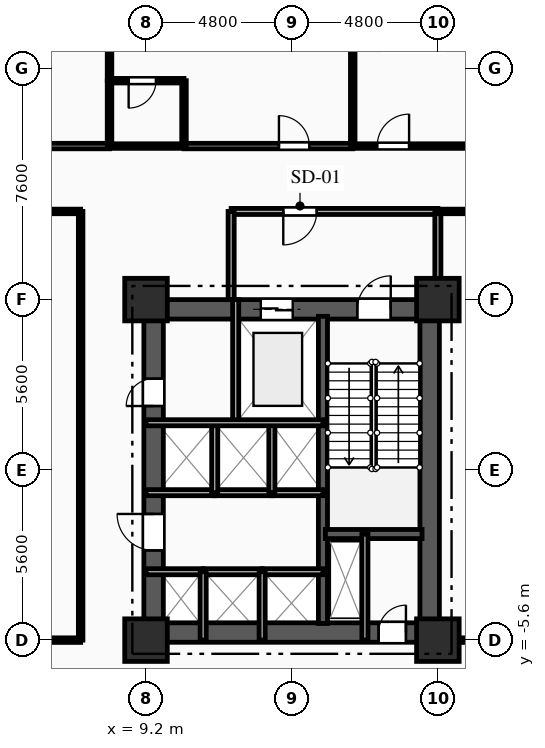
"""IFC4 building model, lengths in metres.
Left out: names, types, materials, properties, quantities, classifications, styles, units other than length and angle.
Written with IfcOpenShell. Run it as: python <this file> out.ifc"""

import sys

from ifc_helpers import new_model, si_unit, direction, frame, frame_2d, origin, origin_2d, place, context, subcontext, project, spatial, rectangle, extrude, element, fill, save


model = new_model("IFC4")
c1 = context("Model", 3, precision=1e-05, world=origin(), true_north=direction((0.0, 1.0)))
c2 = subcontext(c1, "Body", "Model", "MODEL_VIEW")
j1 = project(units=[si_unit("LENGTHUNIT", "METRE"), si_unit("PLANEANGLEUNIT", "RADIAN")], contexts=[c1])
p1 = place(None, origin())
s1 = spatial("IfcSite", under=j1, at=p1, CompositionType="ELEMENT")
p2 = place(p1, origin())
s2 = spatial("IfcBuilding", under=s1, at=p2, CompositionType="ELEMENT")
p3 = place(p2, frame((0.0, 0.0, 18.0)))
s3 = spatial("IfcBuildingStorey", under=s2, at=p3, CompositionType="ELEMENT", Elevation=18.0)
for number, where, z_axis, x_axis in (
    (1, (9.2, -5.6, 0.0), (0.0, 0.0, 1.0), (1.0, 0.0, 0.0)),
    (2, (9.2, 5.6, 0.0), (0.0, 0.0, 1.0), (1.0, 0.0, 0.0)),
    (3, (18.8, -5.6, 0.0), (0.0, 0.0, 1.0), (1.0, 0.0, 0.0)),
    (4, (18.8, 5.6, 0.0), (0.0, 0.0, 1.0), (1.0, 0.0, 0.0)),
):
    element("IfcColumn", number, at=place(p3, frame(where, z_axis=z_axis, x_axis=x_axis)), inside=s3, PredefinedType="COLUMN", context=c2, shape_type="SweptSolid", body=[
        extrude(rectangle(XDim=1.4, YDim=1.4, at=origin_2d()), origin(), (0.0, 0.0, 1.0), 4.5),
    ])
p4 = place(p3, frame((9.2, 5.28, 0.0), z_axis=(0.0, 0.0, 1.0), x_axis=(1.0, 0.0, 0.0)))
e5 = element("IfcWall", 5, at=p4, inside=s3, PredefinedType="SHEAR", context=c2, shape_type="SweptSolid", body=[
    extrude(rectangle(XDim=9.6, YDim=0.64, at=frame_2d((4.8, 0.0))), origin(), (0.0, 0.0, 1.0), 4.17),
])
p5 = place(p4, frame((6.95, 0.0, 0.0)))
e6 = element("IfcOpeningElement", 6, at=p5, cuts=e5, PredefinedType="OPENING", context=c2, shape_type="SweptSolid", body=[
    extrude(rectangle(XDim=1.1, YDim=2.15, at=frame_2d((0.55, 1.075))), frame((0.0, 0.33, 0.0), z_axis=(0.0, -1.0, 0.0), x_axis=(1.0, 0.0, 0.0)), (0.0, 0.0, 1.0), 0.66),
])
p6 = place(p4, frame((3.775, 0.0, 0.0)))
e7 = element("IfcOpeningElement", 7, at=p6, cuts=e5, PredefinedType="OPENING", context=c2, shape_type="SweptSolid", body=[
    extrude(rectangle(XDim=1.05, YDim=2.1, at=frame_2d((0.525, 1.05))), frame((0.0, 0.33, 0.0), z_axis=(0.0, -1.0, 0.0), x_axis=(1.0, 0.0, 0.0)), (0.0, 0.0, 1.0), 0.66),
])
p7 = place(p3, frame((9.2, -5.35, 0.0), z_axis=(0.0, 0.0, 1.0), x_axis=(1.0, 0.0, 0.0)))
e8 = element("IfcWall", 8, at=p7, inside=s3, PredefinedType="SHEAR", context=c2, shape_type="SweptSolid", body=[
    extrude(rectangle(XDim=9.6, YDim=0.64, at=frame_2d((4.8, 0.0))), origin(), (0.0, 0.0, 1.0), 4.17),
])
p8 = place(p7, frame((7.65, 0.0, 0.0)))
e9 = element("IfcOpeningElement", 9, at=p8, cuts=e8, PredefinedType="OPENING", context=c2, shape_type="SweptSolid", body=[
    extrude(rectangle(XDim=0.9, YDim=2.1, at=frame_2d((0.45, 1.05))), frame((0.0, 0.33, 0.0), z_axis=(0.0, -1.0, 0.0), x_axis=(1.0, 0.0, 0.0)), (0.0, 0.0, 1.0), 0.66),
])
p9 = place(p3, frame((9.45, -5.05, 0.0), z_axis=(0.0, 0.0, 1.0), x_axis=(0.0, 1.0, 0.0)))
e10 = element("IfcWall", 10, at=p9, inside=s3, PredefinedType="SHEAR", context=c2, shape_type="SweptSolid", body=[
    extrude(rectangle(XDim=10.1, YDim=0.64, at=frame_2d((5.05, 0.0))), origin(), (0.0, 0.0, 1.0), 4.17),
])
p10 = place(p9, frame((7.15, 0.0, 0.0)))
e11 = element("IfcOpeningElement", 11, at=p10, cuts=e10, PredefinedType="OPENING", context=c2, shape_type="SweptSolid", body=[
    extrude(rectangle(XDim=0.9, YDim=2.1, at=frame_2d((0.45, 1.05))), frame((0.0, 0.33, 0.0), z_axis=(0.0, -1.0, 0.0), x_axis=(1.0, 0.0, 0.0)), (0.0, 0.0, 1.0), 0.66),
])
p11 = place(p9, frame((2.4, 0.0, 0.0)))
e12 = element("IfcOpeningElement", 12, at=p11, cuts=e10, PredefinedType="OPENING", context=c2, shape_type="SweptSolid", body=[
    extrude(rectangle(XDim=1.2, YDim=2.15, at=frame_2d((0.6, 1.075))), frame((0.0, 0.33, 0.0), z_axis=(0.0, -1.0, 0.0), x_axis=(1.0, 0.0, 0.0)), (0.0, 0.0, 1.0), 0.66),
])
p12 = place(p3, frame((18.53, -5.05, 0.0), z_axis=(0.0, 0.0, 1.0), x_axis=(0.0, 1.0, 0.0)))
e13 = element("IfcWall", 13, at=p12, inside=s3, PredefinedType="SHEAR", context=c2, shape_type="SweptSolid", body=[
    extrude(rectangle(XDim=10.1, YDim=0.64, at=frame_2d((5.05, 0.0))), origin(), (0.0, 0.0, 1.0), 4.17),
])
p13 = place(p3, frame((15.02, -5.05, 0.0), z_axis=(0.0, 0.0, 1.0), x_axis=(0.0, 1.0, 0.0)))
e14 = element("IfcWall", 14, at=p13, inside=s3, PredefinedType="SHEAR", context=c2, shape_type="SweptSolid", body=[
    extrude(rectangle(XDim=10.1, YDim=0.3, at=frame_2d((5.05, 0.0))), origin(), (0.0, 0.0, 1.0), 4.17),
])
p14 = place(p3, frame((15.1, -2.11, 0.0), z_axis=(0.0, 0.0, 1.0), x_axis=(1.0, 0.0, 0.0)))
e15 = element("IfcWall", 15, at=p14, inside=s3, PredefinedType="SHEAR", context=c2, shape_type="SweptSolid", body=[
    extrude(rectangle(XDim=3.18, YDim=0.3, at=frame_2d((1.59, 0.0))), origin(), (0.0, 0.0, 1.0), 4.17),
])
p15 = place(p3, frame((16.4, -2.11, 0.0), z_axis=(0.0, 0.0, 1.0), x_axis=(0.0, -1.0, 0.0)))
e16 = element("IfcWall", 16, at=p15, inside=s3, PredefinedType="PARTITIONING", context=c2, shape_type="SweptSolid", body=[
    extrude(rectangle(XDim=3.49, YDim=0.2, at=frame_2d((1.745, 0.0))), origin(), (0.0, 0.0, 1.0), 4.17),
])
p16 = place(p3, frame((12.15, 5.6, 0.0), z_axis=(0.0, 0.0, 1.0), x_axis=(0.0, -1.0, 0.0)))
e17 = element("IfcWall", 17, at=p16, inside=s3, PredefinedType="PARTITIONING", context=c2, shape_type="SweptSolid", body=[
    extrude(rectangle(XDim=4.05, YDim=0.2, at=frame_2d((2.025, 0.0))), origin(), (0.0, 0.0, 1.0), 4.17),
])
p17 = place(p3, frame((18.8, 8.5, 0.0), z_axis=(0.0, 0.0, 1.0), x_axis=(-1.0, 0.0, 0.0)))
e18 = element("IfcWall", 18, at=p17, inside=s3, PredefinedType="PARTITIONING", context=c2, shape_type="SweptSolid", body=[
    extrude(rectangle(XDim=6.8, YDim=0.2, at=frame_2d((3.4, 0.0))), origin(), (0.0, 0.0, 1.0), 4.17),
])
p18 = place(p17, frame((3.985, 0.0, 0.0)))
e19 = element("IfcOpeningElement", 19, at=p18, cuts=e18, PredefinedType="OPENING", context=c2, shape_type="SweptSolid", body=[
    extrude(rectangle(XDim=1.1, YDim=2.15, at=frame_2d((0.55, 1.075))), frame((0.0, 0.11, 0.0), z_axis=(0.0, -1.0, 0.0), x_axis=(1.0, 0.0, 0.0)), (0.0, 0.0, 1.0), 0.22),
])
p19 = place(p3, frame((12.0, 8.5, 0.0), z_axis=(0.0, 0.0, 1.0), x_axis=(0.0, -1.0, 0.0)))
e20 = element("IfcWall", 20, at=p19, inside=s3, PredefinedType="PARTITIONING", context=c2, shape_type="SweptSolid", body=[
    extrude(rectangle(XDim=2.9, YDim=0.2, at=frame_2d((1.45, 0.0))), origin(), (0.0, 0.0, 1.0), 4.17),
])
p20 = place(p3, frame((18.8, 5.6, 0.0), z_axis=(0.0, 0.0, 1.0), x_axis=(0.0, 1.0, 0.0)))
e21 = element("IfcWall", 21, at=p20, inside=s3, PredefinedType="PARTITIONING", context=c2, shape_type="SweptSolid", body=[
    extrude(rectangle(XDim=2.9, YDim=0.2, at=frame_2d((1.45, 0.0))), origin(), (0.0, 0.0, 1.0), 3.655),
])
p21 = place(p3, frame((9.2, -3.35, 0.0), z_axis=(0.0, 0.0, 1.0), x_axis=(1.0, 0.0, 0.0)))
e22 = element("IfcWall", 22, at=p21, inside=s3, PredefinedType="PARTITIONING", context=c2, shape_type="SweptSolid", body=[
    extrude(rectangle(XDim=1.88, YDim=0.2, at=frame_2d((0.94, 0.0))), origin(), (0.0, 0.0, 1.0), 3.885),
])
p22 = place(p3, frame((11.08, -3.35, 0.0), z_axis=(0.0, 0.0, 1.0), x_axis=(1.0, 0.0, 0.0)))
e23 = element("IfcWall", 23, at=p22, inside=s3, PredefinedType="PARTITIONING", context=c2, shape_type="SweptSolid", body=[
    extrude(rectangle(XDim=1.94, YDim=0.2, at=frame_2d((0.97, 0.0))), origin(), (0.0, 0.0, 1.0), 4.17),
])
p23 = place(p3, frame((13.02, -3.35, 0.0), z_axis=(0.0, 0.0, 1.0), x_axis=(1.0, 0.0, 0.0)))
e24 = element("IfcWall", 24, at=p23, inside=s3, PredefinedType="PARTITIONING", context=c2, shape_type="SweptSolid", body=[
    extrude(rectangle(XDim=2.0, YDim=0.2, at=frame_2d((1.0, 0.0))), origin(), (0.0, 0.0, 1.0), 4.17),
])
p24 = place(p3, frame((11.46, -0.75, 0.0), z_axis=(0.0, 0.0, 1.0), x_axis=(-1.0, 0.0, 0.0)))
e25 = element("IfcWall", 25, at=p24, inside=s3, PredefinedType="PARTITIONING", context=c2, shape_type="SweptSolid", body=[
    extrude(rectangle(XDim=2.26, YDim=0.2, at=frame_2d((1.13, 0.0))), origin(), (0.0, 0.0, 1.0), 4.17),
])
p25 = place(p3, frame((13.34, -0.75, 0.0), z_axis=(0.0, 0.0, 1.0), x_axis=(-1.0, 0.0, 0.0)))
e26 = element("IfcWall", 26, at=p25, inside=s3, PredefinedType="PARTITIONING", context=c2, shape_type="SweptSolid", body=[
    extrude(rectangle(XDim=1.88, YDim=0.2, at=frame_2d((0.94, 0.0))), origin(), (0.0, 0.0, 1.0), 4.17),
])
p26 = place(p3, frame((15.02, -0.75, 0.0), z_axis=(0.0, 0.0, 1.0), x_axis=(-1.0, 0.0, 0.0)))
e27 = element("IfcWall", 27, at=p26, inside=s3, PredefinedType="PARTITIONING", context=c2, shape_type="SweptSolid", body=[
    extrude(rectangle(XDim=1.68, YDim=0.2, at=frame_2d((0.84, 0.0))), origin(), (0.0, 0.0, 1.0), 4.17),
])
for number, where, z_axis, x_axis in (
    (28, (11.08, -5.6, 0.0), (0.0, 0.0, 1.0), (0.0, 1.0, 0.0)),
    (29, (13.02, -5.6, 0.0), (0.0, 0.0, 1.0), (0.0, 1.0, 0.0)),
):
    element("IfcWall", number, at=place(p3, frame(where, z_axis=z_axis, x_axis=x_axis)), inside=s3, PredefinedType="PARTITIONING", context=c2, shape_type="SweptSolid", body=[
        extrude(rectangle(XDim=2.25, YDim=0.2, at=frame_2d((1.125, 0.0))), origin(), (0.0, 0.0, 1.0), 4.17),
    ])
for number, where, z_axis, x_axis in (
    (30, (11.46, -0.75, 0.0), (0.0, 0.0, 1.0), (0.0, 1.0, 0.0)),
    (31, (13.34, -0.75, 0.0), (0.0, 0.0, 1.0), (0.0, 1.0, 0.0)),
):
    element("IfcWall", number, at=place(p3, frame(where, z_axis=z_axis, x_axis=x_axis)), inside=s3, PredefinedType="PARTITIONING", context=c2, shape_type="SweptSolid", body=[
        extrude(rectangle(XDim=2.3, YDim=0.2, at=frame_2d((1.15, 0.0))), origin(), (0.0, 0.0, 1.0), 4.17),
    ])
p27 = place(p3, frame((24.0, 8.5, 0.0), z_axis=(0.0, 0.0, 1.0), x_axis=(-1.0, 0.0, 0.0)))
e32 = element("IfcWall", 32, at=p27, inside=s3, PredefinedType="PARTITIONING", context=c2, shape_type="SweptSolid", body=[
    extrude(rectangle(XDim=5.2, YDim=0.15, at=frame_2d((2.6, 0.0))), origin(), (0.0, 0.0, 1.0), 4.17),
])
p28 = place(p27, frame((0.954, 0.0, 0.0)))
e33 = element("IfcOpeningElement", 33, at=p28, cuts=e32, PredefinedType="OPENING", context=c2, shape_type="SweptSolid", body=[
    extrude(rectangle(XDim=1.05, YDim=2.15, at=frame_2d((0.525, 1.075))), frame((0.0, 0.085, 0.0), z_axis=(0.0, -1.0, 0.0), x_axis=(1.0, 0.0, 0.0)), (0.0, 0.0, 1.0), 0.17),
])
p29 = place(p3, frame((2.45, 10.65, 0.0), z_axis=(0.0, 0.0, 1.0), x_axis=(1.0, 0.0, 0.0)))
e34 = element("IfcWall", 34, at=p29, inside=s3, PredefinedType="PARTITIONING", context=c2, shape_type="SweptSolid", body=[
    extrude(rectangle(XDim=5.55, YDim=0.18, at=frame_2d((2.775, 0.0))), origin(), (0.0, 0.0, 1.0), 4.17),
])
p30 = place(p29, frame((1.004, 0.0, 0.0)))
e35 = element("IfcOpeningElement", 35, at=p30, cuts=e34, PredefinedType="OPENING", context=c2, shape_type="SweptSolid", body=[
    extrude(rectangle(XDim=1.0, YDim=2.15, at=frame_2d((0.5, 1.075))), frame((0.0, 0.1, 0.0), z_axis=(0.0, -1.0, 0.0), x_axis=(1.0, 0.0, 0.0)), (0.0, 0.0, 1.0), 0.2),
])
p31 = place(p3, frame((10.45, 10.65, 0.0), z_axis=(0.0, 0.0, 1.0), x_axis=(1.0, 0.0, 0.0)))
e36 = element("IfcWall", 36, at=p31, inside=s3, PredefinedType="PARTITIONING", context=c2, shape_type="SweptSolid", body=[
    extrude(rectangle(XDim=5.55, YDim=0.18, at=frame_2d((2.775, 0.0))), origin(), (0.0, 0.0, 1.0), 4.17),
])
p32 = place(p31, frame((3.123, 0.0, 0.0)))
e37 = element("IfcOpeningElement", 37, at=p32, cuts=e36, PredefinedType="OPENING", context=c2, shape_type="SweptSolid", body=[
    extrude(rectangle(XDim=1.0, YDim=2.15, at=frame_2d((0.5, 1.075))), frame((0.0, 0.1, 0.0), z_axis=(0.0, -1.0, 0.0), x_axis=(1.0, 0.0, 0.0)), (0.0, 0.0, 1.0), 0.2),
])
p33 = place(p3, frame((8.0, 10.65, 0.0), z_axis=(0.0, 0.0, 1.0), x_axis=(1.0, 0.0, 0.0)))
e38 = element("IfcWall", 38, at=p33, inside=s3, PredefinedType="PLUMBINGWALL", context=c2, shape_type="SweptSolid", body=[
    extrude(rectangle(XDim=2.45, YDim=0.15, at=frame_2d((1.225, 0.0))), origin(), (0.0, 0.0, 1.0), 4.17),
])
p34 = place(p3, frame((16.0, 10.65, 0.0), z_axis=(0.0, 0.0, 1.0), x_axis=(1.0, 0.0, 0.0)))
e39 = element("IfcWall", 39, at=p34, inside=s3, PredefinedType="PARTITIONING", context=c2, shape_type="SweptSolid", body=[
    extrude(rectangle(XDim=4.0, YDim=0.15, at=frame_2d((2.0, 0.0))), origin(), (0.0, 0.0, 1.0), 4.17),
])
p35 = place(p34, frame((0.804, 0.0, 0.0)))
e40 = element("IfcOpeningElement", 40, at=p35, cuts=e39, PredefinedType="OPENING", context=c2, shape_type="SweptSolid", body=[
    extrude(rectangle(XDim=1.05, YDim=2.15, at=frame_2d((0.525, 1.075))), frame((0.0, 0.085, 0.0), z_axis=(0.0, -1.0, 0.0), x_axis=(1.0, 0.0, 0.0)), (0.0, 0.0, 1.0), 0.17),
])
p36 = place(p3, frame((7.05, 8.5, 0.0), z_axis=(0.0, 0.0, 1.0), x_axis=(-1.0, 0.0, 0.0)))
e41 = element("IfcWall", 41, at=p36, inside=s3, PredefinedType="PARTITIONING", context=c2, shape_type="SweptSolid", body=[
    extrude(rectangle(XDim=7.05, YDim=0.15, at=frame_2d((3.525, 0.0))), origin(), (0.0, 0.0, 1.0), 4.17),
])
p37 = place(p3, frame((18.8, -5.6, 0.0), z_axis=(0.0, 0.0, 1.0), x_axis=(1.0, 0.0, 0.0)))
e42 = element("IfcWall", 42, at=p37, inside=s3, PredefinedType="PARTITIONING", context=c2, shape_type="SweptSolid", body=[
    extrude(rectangle(XDim=5.2, YDim=0.15, at=frame_2d((2.6, 0.0))), origin(), (0.0, 0.0, 1.0), 4.17),
])
p38 = place(p3, frame((0.0, -5.6, 0.0), z_axis=(0.0, 0.0, 1.0), x_axis=(1.0, 0.0, 0.0)))
e43 = element("IfcWall", 43, at=p38, inside=s3, PredefinedType="PARTITIONING", context=c2, shape_type="SweptSolid", body=[
    extrude(rectangle(XDim=7.05, YDim=0.15, at=frame_2d((3.525, 0.0))), origin(), (0.0, 0.0, 1.0), 3.655),
])
p39 = place(p3, frame((7.05, -5.6, 0.0), z_axis=(0.0, 0.0, 1.0), x_axis=(0.0, 1.0, 0.0)))
e44 = element("IfcWall", 44, at=p39, inside=s3, PredefinedType="PARTITIONING", context=c2, shape_type="SweptSolid", body=[
    extrude(rectangle(XDim=14.1, YDim=0.15, at=frame_2d((7.05, 0.0))), origin(), (0.0, 0.0, 1.0), 4.17),
])
p40 = place(p3, frame((8.0, 24.8, 0.0), z_axis=(0.0, 0.0, 1.0), x_axis=(0.0, -1.0, 0.0)))
e45 = element("IfcWall", 45, at=p40, inside=s3, PredefinedType="PARTITIONING", context=c2, shape_type="SweptSolid", body=[
    extrude(rectangle(XDim=12.0, YDim=0.15, at=frame_2d((6.0, 0.0))), origin(), (0.0, 0.0, 1.0), 4.17),
])
p41 = place(p3, frame((8.0, 12.8, 0.0), z_axis=(0.0, 0.0, 1.0), x_axis=(0.0, -1.0, 0.0)))
e46 = element("IfcWall", 46, at=p41, inside=s3, PredefinedType="PLUMBINGWALL", context=c2, shape_type="SweptSolid", body=[
    extrude(rectangle(XDim=2.15, YDim=0.15, at=frame_2d((1.075, 0.0))), origin(), (0.0, 0.0, 1.0), 4.17),
])
p42 = place(p3, frame((10.45, 12.8, 0.0), z_axis=(0.0, 0.0, 1.0), x_axis=(-1.0, 0.0, 0.0)))
e47 = element("IfcWall", 47, at=p42, inside=s3, PredefinedType="PLUMBINGWALL", context=c2, shape_type="SweptSolid", body=[
    extrude(rectangle(XDim=2.45, YDim=0.15, at=frame_2d((1.225, 0.0))), origin(), (0.0, 0.0, 1.0), 4.17),
])
p43 = place(p42, frame((0.921, 0.0, 0.0)))
e48 = element("IfcOpeningElement", 48, at=p43, cuts=e47, PredefinedType="OPENING", context=c2, shape_type="SweptSolid", body=[
    extrude(rectangle(XDim=0.9, YDim=2.1, at=frame_2d((0.45, 1.05))), frame((0.0, 0.085, 0.0), z_axis=(0.0, -1.0, 0.0), x_axis=(1.0, 0.0, 0.0)), (0.0, 0.0, 1.0), 0.17),
])
p44 = place(p3, frame((10.45, 10.65, 0.0), z_axis=(0.0, 0.0, 1.0), x_axis=(0.0, 1.0, 0.0)))
e49 = element("IfcWall", 49, at=p44, inside=s3, PredefinedType="PLUMBINGWALL", context=c2, shape_type="SweptSolid", body=[
    extrude(rectangle(XDim=2.15, YDim=0.15, at=frame_2d((1.075, 0.0))), origin(), (0.0, 0.0, 1.0), 4.17),
])
p45 = place(p3, frame((16.0, 24.8, 0.0), z_axis=(0.0, 0.0, 1.0), x_axis=(0.0, -1.0, 0.0)))
e50 = element("IfcWall", 50, at=p45, inside=s3, PredefinedType="PARTITIONING", context=c2, shape_type="SweptSolid", body=[
    extrude(rectangle(XDim=14.15, YDim=0.15, at=frame_2d((7.075, 0.0))), origin(), (0.0, 0.0, 1.0), 4.17),
])
p46 = place(p3, frame((9.2, 1.55, 0.0), z_axis=(0.0, 0.0, 1.0), x_axis=(1.0, 0.0, 0.0)))
e51 = element("IfcWall", 51, at=p46, inside=s3, PredefinedType="PARTITIONING", context=c2, shape_type="SweptSolid", body=[
    extrude(rectangle(XDim=5.82, YDim=0.2, at=frame_2d((2.91, 0.0))), origin(), (0.0, 0.0, 1.0), 4.17),
])
p47 = place(p5, origin())
e52 = element("IfcDoor", 52, at=p47, inside=s3, OperationType="SINGLE_SWING_RIGHT", PredefinedType="DOOR", context=c2, shape_type="SweptSolid", body=[
    extrude(rectangle(XDim=1.1, YDim=2.15, at=frame_2d((0.55, 1.075))), frame((0.0, 0.025, 0.0), z_axis=(0.0, -1.0, 0.0), x_axis=(1.0, 0.0, 0.0)), (0.0, 0.0, 1.0), 0.05),
])
fill(e6, e52)
p48 = place(p6, origin())
e53 = element("IfcDoor", 53, at=p48, inside=s3, OperationType="DOUBLE_DOOR_SLIDING", PredefinedType="DOOR", context=c2, shape_type="SweptSolid", body=[
    extrude(rectangle(XDim=1.05, YDim=2.1, at=frame_2d((0.525, 1.05))), frame((0.0, 0.025, 0.0), z_axis=(0.0, -1.0, 0.0), x_axis=(1.0, 0.0, 0.0)), (0.0, 0.0, 1.0), 0.05),
])
fill(e7, e53)
p49 = place(p8, origin())
e54 = element("IfcDoor", 54, at=p49, inside=s3, OperationType="SINGLE_SWING_RIGHT", PredefinedType="DOOR", context=c2, shape_type="SweptSolid", body=[
    extrude(rectangle(XDim=0.9, YDim=2.1, at=frame_2d((0.45, 1.05))), frame((0.0, 0.025, 0.0), z_axis=(0.0, -1.0, 0.0), x_axis=(1.0, 0.0, 0.0)), (0.0, 0.0, 1.0), 0.05),
])
fill(e9, e54)
p50 = place(p18, origin())
e55 = element("IfcDoor", 55, at=p50, inside=s3, OperationType="SINGLE_SWING_RIGHT", PredefinedType="DOOR", context=c2, shape_type="SweptSolid", body=[
    extrude(rectangle(XDim=1.1, YDim=2.15, at=frame_2d((0.55, 1.075))), frame((0.0, 0.025, 0.0), z_axis=(0.0, -1.0, 0.0), x_axis=(1.0, 0.0, 0.0)), (0.0, 0.0, 1.0), 0.05),
])
fill(e19, e55)
p51 = place(p10, origin())
e56 = element("IfcDoor", 56, at=p51, inside=s3, OperationType="SINGLE_SWING_LEFT", PredefinedType="DOOR", context=c2, shape_type="SweptSolid", body=[
    extrude(rectangle(XDim=0.9, YDim=2.1, at=frame_2d((0.45, 1.05))), frame((0.0, 0.025, 0.0), z_axis=(0.0, -1.0, 0.0), x_axis=(1.0, 0.0, 0.0)), (0.0, 0.0, 1.0), 0.05),
])
fill(e11, e56)
p52 = place(p11, origin())
e57 = element("IfcDoor", 57, at=p52, inside=s3, OperationType="SINGLE_SWING_RIGHT", PredefinedType="DOOR", context=c2, shape_type="SweptSolid", body=[
    extrude(rectangle(XDim=1.2, YDim=2.15, at=frame_2d((0.6, 1.075))), frame((0.0, 0.025, 0.0), z_axis=(0.0, -1.0, 0.0), x_axis=(1.0, 0.0, 0.0)), (0.0, 0.0, 1.0), 0.05),
])
fill(e12, e57)
p53 = place(p32, origin())
e58 = element("IfcDoor", 58, at=p53, inside=s3, OperationType="SINGLE_SWING_LEFT", PredefinedType="DOOR", context=c2, shape_type="SweptSolid", body=[
    extrude(rectangle(XDim=1.0, YDim=2.15, at=frame_2d((0.5, 1.075))), frame((0.0, 0.025, 0.0), z_axis=(0.0, -1.0, 0.0), x_axis=(1.0, 0.0, 0.0)), (0.0, 0.0, 1.0), 0.05),
])
fill(e37, e58)
p54 = place(p35, origin())
e59 = element("IfcDoor", 59, at=p54, inside=s3, OperationType="SINGLE_SWING_RIGHT", PredefinedType="DOOR", context=c2, shape_type="SweptSolid", body=[
    extrude(rectangle(XDim=1.05, YDim=2.15, at=frame_2d((0.525, 1.075))), frame((0.0, 0.025, 0.0), z_axis=(0.0, -1.0, 0.0), x_axis=(1.0, 0.0, 0.0)), (0.0, 0.0, 1.0), 0.05),
])
fill(e40, e59)
p55 = place(p43, origin())
e60 = element("IfcDoor", 60, at=p55, inside=s3, OperationType="SINGLE_SWING_RIGHT", PredefinedType="DOOR", context=c2, shape_type="SweptSolid", body=[
    extrude(rectangle(XDim=0.9, YDim=2.1, at=frame_2d((0.45, 1.05))), frame((0.0, 0.025, 0.0), z_axis=(0.0, -1.0, 0.0), x_axis=(1.0, 0.0, 0.0)), (0.0, 0.0, 1.0), 0.05),
])
fill(e48, e60)
save(model, sys.argv[1])
